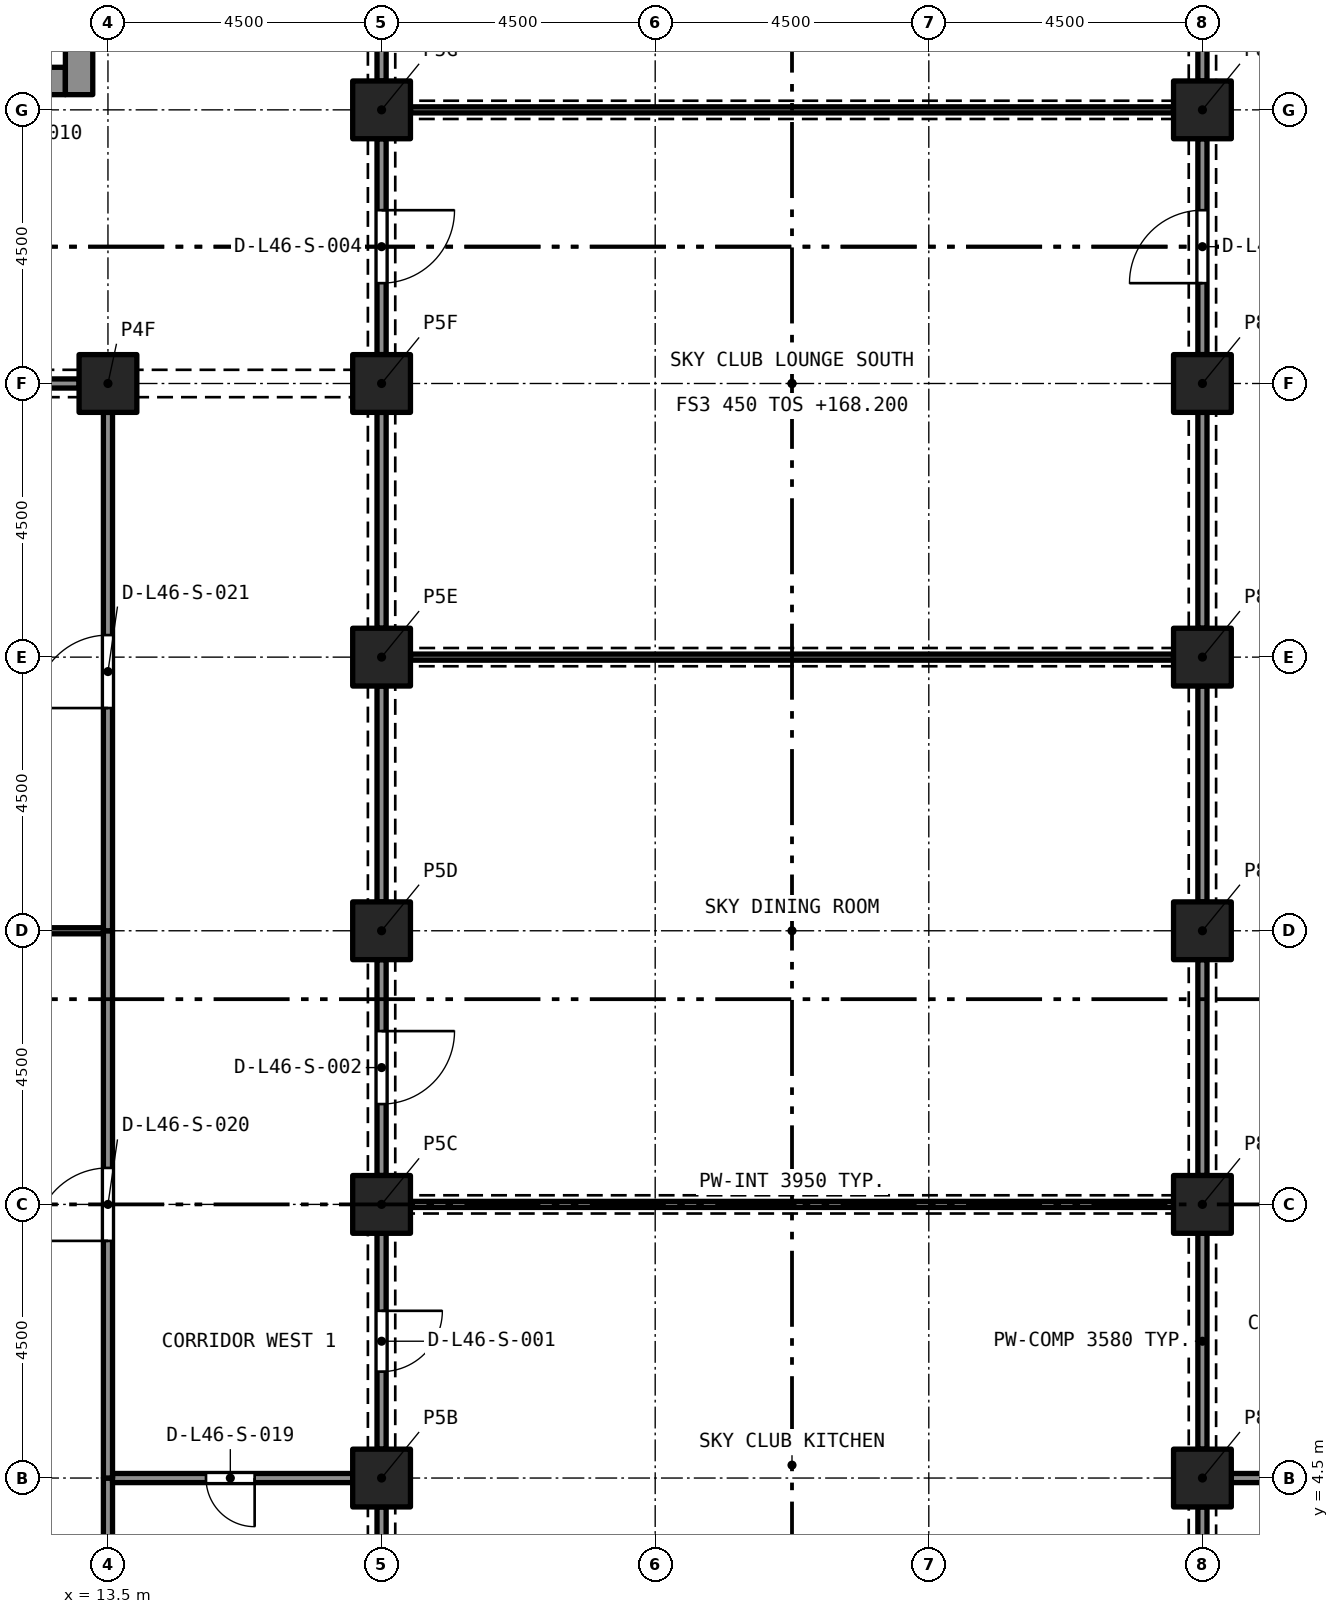
"""IFC4 building model, lengths in metres.
Left out: names, types, materials, properties, quantities, classifications, styles, units other than length and angle.
Written with IfcOpenShell. Run it as: python <this file> out.ifc"""

import sys

from ifc_helpers import new_model, si_unit, direction, frame, frame_2d, origin, origin_2d, place, context, subcontext, project, spatial, rectangle, extrude, element, fill, save


model = new_model("IFC4")
c1 = context("Model", 3, precision=1e-05, world=origin(), true_north=direction((0.0, 1.0)))
c2 = subcontext(c1, "Body", "Model", "MODEL_VIEW")
j1 = project(units=[si_unit("LENGTHUNIT", "METRE"), si_unit("PLANEANGLEUNIT", "RADIAN")], contexts=[c1])
p1 = place(None, origin())
s1 = spatial("IfcSite", under=j1, at=p1, CompositionType="ELEMENT")
p2 = place(p1, origin())
s2 = spatial("IfcBuilding", under=s1, at=p2, CompositionType="ELEMENT")
p3 = place(p2, frame((0.0, 0.0, 168.2)))
s3 = spatial("IfcBuildingStorey", under=s2, at=p3, CompositionType="ELEMENT", Elevation=168.2)
for number, where, z_axis, x_axis in (
    (1, (18.0, 4.5, 0.0), (0.0, 0.0, 1.0), (1.0, 0.0, 0.0)),
    (2, (31.5, 4.5, 0.0), (0.0, 0.0, 1.0), (1.0, 0.0, 0.0)),
    (3, (18.0, 9.0, 0.0), (0.0, 0.0, 1.0), (1.0, 0.0, 0.0)),
    (4, (31.5, 9.0, 0.0), (0.0, 0.0, 1.0), (1.0, 0.0, 0.0)),
    (5, (18.0, 13.5, 0.0), (0.0, 0.0, 1.0), (1.0, 0.0, 0.0)),
    (6, (31.5, 13.5, 0.0), (0.0, 0.0, 1.0), (1.0, 0.0, 0.0)),
    (7, (18.0, 18.0, 0.0), (0.0, 0.0, 1.0), (1.0, 0.0, 0.0)),
    (8, (31.5, 18.0, 0.0), (0.0, 0.0, 1.0), (1.0, 0.0, 0.0)),
    (9, (13.5, 22.5, 0.0), (0.0, 0.0, 1.0), (1.0, 0.0, 0.0)),
    (10, (18.0, 22.5, 0.0), (0.0, 0.0, 1.0), (1.0, 0.0, 0.0)),
    (11, (31.5, 22.5, 0.0), (0.0, 0.0, 1.0), (1.0, 0.0, 0.0)),
    (12, (18.0, 27.0, 0.0), (0.0, 0.0, 1.0), (1.0, 0.0, 0.0)),
    (13, (31.5, 27.0, 0.0), (0.0, 0.0, 1.0), (1.0, 0.0, 0.0)),
):
    element("IfcColumn", number, at=place(p3, frame(where, z_axis=z_axis, x_axis=x_axis)), inside=s3, PredefinedType="COLUMN", context=c2, shape_type="SweptSolid", body=[
        extrude(rectangle(XDim=0.95, YDim=0.95, at=origin_2d()), origin(), (0.0, 0.0, 1.0), 4.4),
    ])
p4 = place(p3, frame((5.2, 27.475, 0.0), z_axis=(0.0, 0.0, 1.0), x_axis=(1.0, 0.0, 0.0)))
e14 = element("IfcWall", 14, at=p4, inside=s3, PredefinedType="SOLIDWALL", context=c2, shape_type="SweptSolid", body=[
    extrude(rectangle(XDim=7.6, YDim=0.45, at=frame_2d((3.8, 0.0))), origin(), (0.0, 0.0, 1.0), 4.4),
])
p5 = place(p4, frame((0.725, 0.0, 0.0)))
e15 = element("IfcOpeningElement", 15, at=p5, cuts=e14, PredefinedType="OPENING", context=c2, shape_type="SweptSolid", body=[
    extrude(rectangle(XDim=1.1, YDim=2.1, at=frame_2d((0.55, 1.05))), frame((0.0, 0.235, 0.0), z_axis=(0.0, -1.0, 0.0), x_axis=(1.0, 0.0, 0.0)), (0.0, 0.0, 1.0), 0.47),
])
p6 = place(p4, frame((3.25, 0.0, 0.0)))
e16 = element("IfcOpeningElement", 16, at=p6, cuts=e14, PredefinedType="OPENING", context=c2, shape_type="SweptSolid", body=[
    extrude(rectangle(XDim=1.1, YDim=2.1, at=frame_2d((0.55, 1.05))), frame((0.0, 0.235, 0.0), z_axis=(0.0, -1.0, 0.0), x_axis=(1.0, 0.0, 0.0)), (0.0, 0.0, 1.0), 0.47),
])
p7 = place(p4, frame((5.775, 0.0, 0.0)))
e17 = element("IfcOpeningElement", 17, at=p7, cuts=e14, PredefinedType="OPENING", context=c2, shape_type="SweptSolid", body=[
    extrude(rectangle(XDim=1.1, YDim=2.1, at=frame_2d((0.55, 1.05))), frame((0.0, 0.235, 0.0), z_axis=(0.0, -1.0, 0.0), x_axis=(1.0, 0.0, 0.0)), (0.0, 0.0, 1.0), 0.47),
])
p8 = place(p3, frame((13.025, 27.25, 0.0), z_axis=(0.0, 0.0, 1.0), x_axis=(0.0, 1.0, 0.0)))
e18 = element("IfcWall", 18, at=p8, inside=s3, PredefinedType="SOLIDWALL", context=c2, shape_type="SweptSolid", body=[
    extrude(rectangle(XDim=13.0, YDim=0.45, at=frame_2d((6.5, 0.0))), origin(), (0.0, 0.0, 1.0), 4.4),
])
p9 = place(p8, frame((10.85, 0.0, 0.0)))
e19 = element("IfcOpeningElement", 19, at=p9, cuts=e18, PredefinedType="OPENING", context=c2, shape_type="SweptSolid", body=[
    extrude(rectangle(XDim=1.1, YDim=2.1, at=frame_2d((0.55, 1.05))), frame((0.0, 0.235, 0.0), z_axis=(0.0, -1.0, 0.0), x_axis=(1.0, 0.0, 0.0)), (0.0, 0.0, 1.0), 0.47),
])
p10 = place(p8, frame((8.7, 0.0, 0.0)))
e20 = element("IfcOpeningElement", 20, at=p10, cuts=e18, PredefinedType="OPENING", context=c2, shape_type="SweptSolid", body=[
    extrude(rectangle(XDim=1.2, YDim=2.1, at=frame_2d((0.6, 1.05))), frame((0.0, 0.235, 0.0), z_axis=(0.0, -1.0, 0.0), x_axis=(1.0, 0.0, 0.0)), (0.0, 0.0, 1.0), 0.47),
])
p11 = place(p3, frame((18.475, 9.0, 0.0), z_axis=(0.0, 0.0, 1.0), x_axis=(1.0, 0.0, 0.0)))
e21 = element("IfcWall", 21, at=p11, inside=s3, PredefinedType="PARTITIONING", context=c2, shape_type="SweptSolid", body=[
    extrude(rectangle(XDim=12.55, YDim=0.1, at=frame_2d((6.275, 0.0))), origin(), (0.0, 0.0, 1.0), 3.95),
])
for number, where, z_axis, x_axis in (
    (22, (31.5, 0.475, 0.0), (0.0, 0.0, 1.0), (0.0, 1.0, 0.0)),
    (23, (31.5, 4.975, 0.0), (0.0, 0.0, 1.0), (0.0, 1.0, 0.0)),
    (24, (18.0, 0.475, 0.0), (0.0, 0.0, 1.0), (0.0, 1.0, 0.0)),
):
    element("IfcWall", number, at=place(p3, frame(where, z_axis=z_axis, x_axis=x_axis)), inside=s3, PredefinedType="PARTITIONING", context=c2, shape_type="SweptSolid", body=[
        extrude(rectangle(XDim=3.55, YDim=0.15, at=frame_2d((1.775, 0.0))), origin(), (0.0, 0.0, 1.0), 3.58),
    ])
p12 = place(p3, frame((18.0, 8.525, 0.0), z_axis=(0.0, 0.0, 1.0), x_axis=(0.0, -1.0, 0.0)))
e25 = element("IfcWall", 25, at=p12, inside=s3, PredefinedType="PARTITIONING", context=c2, shape_type="SweptSolid", body=[
    extrude(rectangle(XDim=3.55, YDim=0.15, at=frame_2d((1.775, 0.0))), origin(), (0.0, 0.0, 1.0), 3.58),
])
p13 = place(p12, frame((1.275, 0.0, 0.0)))
e26 = element("IfcOpeningElement", 26, at=p13, cuts=e25, PredefinedType="OPENING", context=c2, shape_type="SweptSolid", body=[
    extrude(rectangle(XDim=1.0, YDim=2.1, at=frame_2d((0.5, 1.05))), frame((0.0, 0.085, 0.0), z_axis=(0.0, -1.0, 0.0), x_axis=(1.0, 0.0, 0.0)), (0.0, 0.0, 1.0), 0.17),
])
p14 = place(p3, frame((18.475, 18.0, 0.0), z_axis=(0.0, 0.0, 1.0), x_axis=(1.0, 0.0, 0.0)))
e27 = element("IfcWall", 27, at=p14, inside=s3, PredefinedType="PARTITIONING", context=c2, shape_type="SweptSolid", body=[
    extrude(rectangle(XDim=12.55, YDim=0.1, at=frame_2d((6.275, 0.0))), origin(), (0.0, 0.0, 1.0), 3.95),
])
for number, where, z_axis, x_axis in (
    (28, (31.5, 13.975, 0.0), (0.0, 0.0, 1.0), (0.0, 1.0, 0.0)),
    (29, (31.5, 9.475, 0.0), (0.0, 0.0, 1.0), (0.0, 1.0, 0.0)),
):
    element("IfcWall", number, at=place(p3, frame(where, z_axis=z_axis, x_axis=x_axis)), inside=s3, PredefinedType="PARTITIONING", context=c2, shape_type="SweptSolid", body=[
        extrude(rectangle(XDim=3.55, YDim=0.15, at=frame_2d((1.775, 0.0))), origin(), (0.0, 0.0, 1.0), 3.58),
    ])
p15 = place(p3, frame((18.0, 13.025, 0.0), z_axis=(0.0, 0.0, 1.0), x_axis=(0.0, -1.0, 0.0)))
e30 = element("IfcWall", 30, at=p15, inside=s3, PredefinedType="PARTITIONING", context=c2, shape_type="SweptSolid", body=[
    extrude(rectangle(XDim=3.55, YDim=0.15, at=frame_2d((1.775, 0.0))), origin(), (0.0, 0.0, 1.0), 3.58),
])
p16 = place(p15, frame((1.175, 0.0, 0.0)))
e31 = element("IfcOpeningElement", 31, at=p16, cuts=e30, PredefinedType="OPENING", context=c2, shape_type="SweptSolid", body=[
    extrude(rectangle(XDim=1.2, YDim=2.1, at=frame_2d((0.6, 1.05))), frame((0.0, 0.085, 0.0), z_axis=(0.0, -1.0, 0.0), x_axis=(1.0, 0.0, 0.0)), (0.0, 0.0, 1.0), 0.17),
])
p17 = place(p3, frame((18.0, 13.975, 0.0), z_axis=(0.0, 0.0, 1.0), x_axis=(0.0, 1.0, 0.0)))
e32 = element("IfcWall", 32, at=p17, inside=s3, PredefinedType="PARTITIONING", context=c2, shape_type="SweptSolid", body=[
    extrude(rectangle(XDim=3.55, YDim=0.15, at=frame_2d((1.775, 0.0))), origin(), (0.0, 0.0, 1.0), 3.58),
])
p18 = place(p3, frame((18.475, 27.0, 0.0), z_axis=(0.0, 0.0, 1.0), x_axis=(1.0, 0.0, 0.0)))
e33 = element("IfcWall", 33, at=p18, inside=s3, PredefinedType="PARTITIONING", context=c2, shape_type="SweptSolid", body=[
    extrude(rectangle(XDim=12.55, YDim=0.1, at=frame_2d((6.275, 0.0))), origin(), (0.0, 0.0, 1.0), 3.95),
])
p19 = place(p3, frame((31.5, 22.975, 0.0), z_axis=(0.0, 0.0, 1.0), x_axis=(0.0, 1.0, 0.0)))
e34 = element("IfcWall", 34, at=p19, inside=s3, PredefinedType="PARTITIONING", context=c2, shape_type="SweptSolid", body=[
    extrude(rectangle(XDim=3.55, YDim=0.15, at=frame_2d((1.775, 0.0))), origin(), (0.0, 0.0, 1.0), 3.58),
])
p20 = place(p19, frame((1.175, 0.0, 0.0)))
e35 = element("IfcOpeningElement", 35, at=p20, cuts=e34, PredefinedType="OPENING", context=c2, shape_type="SweptSolid", body=[
    extrude(rectangle(XDim=1.2, YDim=2.1, at=frame_2d((0.6, 1.05))), frame((0.0, 0.085, 0.0), z_axis=(0.0, -1.0, 0.0), x_axis=(1.0, 0.0, 0.0)), (0.0, 0.0, 1.0), 0.17),
])
p21 = place(p3, frame((31.5, 18.475, 0.0), z_axis=(0.0, 0.0, 1.0), x_axis=(0.0, 1.0, 0.0)))
e36 = element("IfcWall", 36, at=p21, inside=s3, PredefinedType="PARTITIONING", context=c2, shape_type="SweptSolid", body=[
    extrude(rectangle(XDim=3.55, YDim=0.15, at=frame_2d((1.775, 0.0))), origin(), (0.0, 0.0, 1.0), 3.58),
])
p22 = place(p3, frame((18.0, 26.525, 0.0), z_axis=(0.0, 0.0, 1.0), x_axis=(0.0, -1.0, 0.0)))
e37 = element("IfcWall", 37, at=p22, inside=s3, PredefinedType="PARTITIONING", context=c2, shape_type="SweptSolid", body=[
    extrude(rectangle(XDim=3.55, YDim=0.15, at=frame_2d((1.775, 0.0))), origin(), (0.0, 0.0, 1.0), 3.58),
])
p23 = place(p22, frame((1.175, 0.0, 0.0)))
e38 = element("IfcOpeningElement", 38, at=p23, cuts=e37, PredefinedType="OPENING", context=c2, shape_type="SweptSolid", body=[
    extrude(rectangle(XDim=1.2, YDim=2.1, at=frame_2d((0.6, 1.05))), frame((0.0, 0.085, 0.0), z_axis=(0.0, -1.0, 0.0), x_axis=(1.0, 0.0, 0.0)), (0.0, 0.0, 1.0), 0.17),
])
for number, where, z_axis, x_axis in (
    (39, (18.0, 18.475, 0.0), (0.0, 0.0, 1.0), (0.0, 1.0, 0.0)),
    (40, (31.5, 27.475, 0.0), (0.0, 0.0, 1.0), (0.0, 1.0, 0.0)),
):
    element("IfcWall", number, at=place(p3, frame(where, z_axis=z_axis, x_axis=x_axis)), inside=s3, PredefinedType="PARTITIONING", context=c2, shape_type="SweptSolid", body=[
        extrude(rectangle(XDim=3.55, YDim=0.15, at=frame_2d((1.775, 0.0))), origin(), (0.0, 0.0, 1.0), 3.58),
    ])
p24 = place(p3, frame((18.0, 31.025, 0.0), z_axis=(0.0, 0.0, 1.0), x_axis=(0.0, -1.0, 0.0)))
e41 = element("IfcWall", 41, at=p24, inside=s3, PredefinedType="PARTITIONING", context=c2, shape_type="SweptSolid", body=[
    extrude(rectangle(XDim=3.55, YDim=0.15, at=frame_2d((1.775, 0.0))), origin(), (0.0, 0.0, 1.0), 3.58),
])
p25 = place(p24, frame((1.175, 0.0, 0.0)))
e42 = element("IfcOpeningElement", 42, at=p25, cuts=e41, PredefinedType="OPENING", context=c2, shape_type="SweptSolid", body=[
    extrude(rectangle(XDim=1.2, YDim=2.1, at=frame_2d((0.6, 1.05))), frame((0.0, 0.085, 0.0), z_axis=(0.0, -1.0, 0.0), x_axis=(1.0, 0.0, 0.0)), (0.0, 0.0, 1.0), 0.17),
])
p26 = place(p3, frame((35.925, 4.5, 0.0), z_axis=(0.0, 0.0, 1.0), x_axis=(-1.0, 0.0, 0.0)))
e43 = element("IfcWall", 43, at=p26, inside=s3, PredefinedType="PARTITIONING", context=c2, shape_type="SweptSolid", body=[
    extrude(rectangle(XDim=3.95, YDim=0.15, at=frame_2d((1.975, 0.0))), origin(), (0.0, 0.0, 1.0), 4.1),
])
p27 = place(p26, frame((1.538, 0.0, 0.0)))
e44 = element("IfcOpeningElement", 44, at=p27, cuts=e43, PredefinedType="OPENING", context=c2, shape_type="SweptSolid", body=[
    extrude(rectangle(XDim=0.8, YDim=2.1, at=frame_2d((0.4, 1.05))), frame((0.0, 0.085, 0.0), z_axis=(0.0, -1.0, 0.0), x_axis=(1.0, 0.0, 0.0)), (0.0, 0.0, 1.0), 0.17),
])
p28 = place(p3, frame((9.475, 22.5, 0.0), z_axis=(0.0, 0.0, 1.0), x_axis=(1.0, 0.0, 0.0)))
e45 = element("IfcWall", 45, at=p28, inside=s3, PredefinedType="PARTITIONING", context=c2, shape_type="SweptSolid", body=[
    extrude(rectangle(XDim=3.55, YDim=0.15, at=frame_2d((1.775, 0.0))), origin(), (0.0, 0.0, 1.0), 3.58),
])
p29 = place(p3, frame((13.5, 0.475, 0.0), z_axis=(0.0, 0.0, 1.0), x_axis=(0.0, 1.0, 0.0)))
e46 = element("IfcWall", 46, at=p29, inside=s3, PredefinedType="PARTITIONING", context=c2, shape_type="SweptSolid", body=[
    extrude(rectangle(XDim=4.025, YDim=0.15, at=frame_2d((2.012, 0.0))), origin(), (0.0, 0.0, 1.0), 4.1),
])
p30 = place(p3, frame((17.525, 4.5, 0.0), z_axis=(0.0, 0.0, 1.0), x_axis=(-1.0, 0.0, 0.0)))
e47 = element("IfcWall", 47, at=p30, inside=s3, PredefinedType="PARTITIONING", context=c2, shape_type="SweptSolid", body=[
    extrude(rectangle(XDim=3.95, YDim=0.15, at=frame_2d((1.975, 0.0))), origin(), (0.0, 0.0, 1.0), 4.1),
])
p31 = place(p30, frame((1.613, 0.0, 0.0)))
e48 = element("IfcOpeningElement", 48, at=p31, cuts=e47, PredefinedType="OPENING", context=c2, shape_type="SweptSolid", body=[
    extrude(rectangle(XDim=0.8, YDim=2.1, at=frame_2d((0.4, 1.05))), frame((0.0, 0.085, 0.0), z_axis=(0.0, -1.0, 0.0), x_axis=(1.0, 0.0, 0.0)), (0.0, 0.0, 1.0), 0.17),
])
p32 = place(p3, frame((13.5, 4.5, 0.0), z_axis=(0.0, 0.0, 1.0), x_axis=(0.0, 1.0, 0.0)))
e49 = element("IfcWall", 49, at=p32, inside=s3, PredefinedType="PARTITIONING", context=c2, shape_type="SweptSolid", body=[
    extrude(rectangle(XDim=9.0, YDim=0.15, at=frame_2d((4.5, 0.0))), origin(), (0.0, 0.0, 1.0), 4.1),
])
p33 = place(p32, frame((3.9, 0.0, 0.0)))
e50 = element("IfcOpeningElement", 50, at=p33, cuts=e49, PredefinedType="OPENING", context=c2, shape_type="SweptSolid", body=[
    extrude(rectangle(XDim=1.2, YDim=2.1, at=frame_2d((0.6, 1.05))), frame((0.0, 0.085, 0.0), z_axis=(0.0, -1.0, 0.0), x_axis=(1.0, 0.0, 0.0)), (0.0, 0.0, 1.0), 0.17),
])
p34 = place(p3, frame((13.5, 13.5, 0.0), z_axis=(0.0, 0.0, 1.0), x_axis=(0.0, 1.0, 0.0)))
e51 = element("IfcWall", 51, at=p34, inside=s3, PredefinedType="PARTITIONING", context=c2, shape_type="SweptSolid", body=[
    extrude(rectangle(XDim=8.525, YDim=0.15, at=frame_2d((4.262, 0.0))), origin(), (0.0, 0.0, 1.0), 4.1),
])
p35 = place(p34, frame((3.663, 0.0, 0.0)))
e52 = element("IfcOpeningElement", 52, at=p35, cuts=e51, PredefinedType="OPENING", context=c2, shape_type="SweptSolid", body=[
    extrude(rectangle(XDim=1.2, YDim=2.1, at=frame_2d((0.6, 1.05))), frame((0.0, 0.085, 0.0), z_axis=(0.0, -1.0, 0.0), x_axis=(1.0, 0.0, 0.0)), (0.0, 0.0, 1.0), 0.17),
])
p36 = place(p3, frame((0.475, 13.5, 0.0), z_axis=(0.0, 0.0, 1.0), x_axis=(1.0, 0.0, 0.0)))
e53 = element("IfcWall", 53, at=p36, inside=s3, PredefinedType="PARTITIONING", context=c2, shape_type="SweptSolid", body=[
    extrude(rectangle(XDim=12.95, YDim=0.1, at=frame_2d((6.475, 0.0))), origin(), (0.0, 0.0, 1.0), 4.1),
])
p37 = place(p13, origin())
e54 = element("IfcDoor", 54, at=p37, inside=s3, OperationType="SINGLE_SWING_RIGHT", PredefinedType="DOOR", context=c2, shape_type="SweptSolid", body=[
    extrude(rectangle(XDim=1.0, YDim=2.1, at=frame_2d((0.5, 1.05))), frame((0.0, 0.025, 0.0), z_axis=(0.0, -1.0, 0.0), x_axis=(1.0, 0.0, 0.0)), (0.0, 0.0, 1.0), 0.05),
])
fill(e26, e54)
p38 = place(p16, origin())
e55 = element("IfcDoor", 55, at=p38, inside=s3, OperationType="SINGLE_SWING_LEFT", PredefinedType="DOOR", context=c2, shape_type="SweptSolid", body=[
    extrude(rectangle(XDim=1.2, YDim=2.1, at=frame_2d((0.6, 1.05))), frame((0.0, 0.025, 0.0), z_axis=(0.0, -1.0, 0.0), x_axis=(1.0, 0.0, 0.0)), (0.0, 0.0, 1.0), 0.05),
])
fill(e31, e55)
p39 = place(p20, origin())
e56 = element("IfcDoor", 56, at=p39, inside=s3, OperationType="SINGLE_SWING_LEFT", PredefinedType="DOOR", context=c2, shape_type="SweptSolid", body=[
    extrude(rectangle(XDim=1.2, YDim=2.1, at=frame_2d((0.6, 1.05))), frame((0.0, 0.025, 0.0), z_axis=(0.0, -1.0, 0.0), x_axis=(1.0, 0.0, 0.0)), (0.0, 0.0, 1.0), 0.05),
])
fill(e35, e56)
p40 = place(p23, origin())
e57 = element("IfcDoor", 57, at=p40, inside=s3, OperationType="SINGLE_SWING_LEFT", PredefinedType="DOOR", context=c2, shape_type="SweptSolid", body=[
    extrude(rectangle(XDim=1.2, YDim=2.1, at=frame_2d((0.6, 1.05))), frame((0.0, 0.025, 0.0), z_axis=(0.0, -1.0, 0.0), x_axis=(1.0, 0.0, 0.0)), (0.0, 0.0, 1.0), 0.05),
])
fill(e38, e57)
p41 = place(p31, origin())
e58 = element("IfcDoor", 58, at=p41, inside=s3, OperationType="SINGLE_SWING_RIGHT", PredefinedType="DOOR", context=c2, shape_type="SweptSolid", body=[
    extrude(rectangle(XDim=0.8, YDim=2.1, at=frame_2d((0.4, 1.05))), frame((0.0, 0.025, 0.0), z_axis=(0.0, -1.0, 0.0), x_axis=(1.0, 0.0, 0.0)), (0.0, 0.0, 1.0), 0.05),
])
fill(e48, e58)
p42 = place(p33, origin())
e59 = element("IfcDoor", 59, at=p42, inside=s3, OperationType="SINGLE_SWING_RIGHT", PredefinedType="DOOR", context=c2, shape_type="SweptSolid", body=[
    extrude(rectangle(XDim=1.2, YDim=2.1, at=frame_2d((0.6, 1.05))), frame((0.0, 0.025, 0.0), z_axis=(0.0, -1.0, 0.0), x_axis=(1.0, 0.0, 0.0)), (0.0, 0.0, 1.0), 0.05),
])
fill(e50, e59)
p43 = place(p35, origin())
e60 = element("IfcDoor", 60, at=p43, inside=s3, OperationType="SINGLE_SWING_RIGHT", PredefinedType="DOOR", context=c2, shape_type="SweptSolid", body=[
    extrude(rectangle(XDim=1.2, YDim=2.1, at=frame_2d((0.6, 1.05))), frame((0.0, 0.025, 0.0), z_axis=(0.0, -1.0, 0.0), x_axis=(1.0, 0.0, 0.0)), (0.0, 0.0, 1.0), 0.05),
])
fill(e52, e60)
save(model, sys.argv[1])
